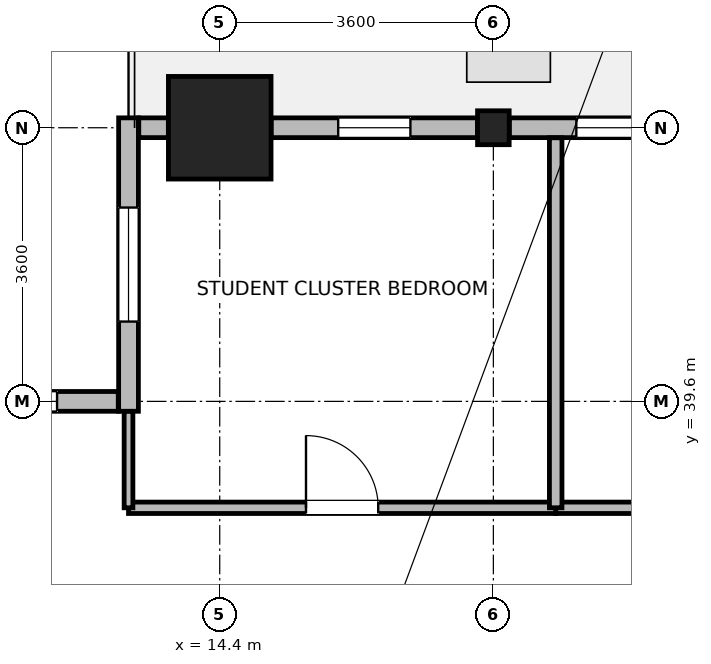
"""IFC4 building model, lengths in metres.
Left out: names, types, materials, properties, quantities, classifications, styles, units other than length and angle.
Written with IfcOpenShell. Run it as: python <this file> out.ifc"""

import sys

from ifc_helpers import new_model, si_unit, direction, frame, frame_2d, origin, origin_2d, place, context, subcontext, project, spatial, rectangle, i_section, extrude, source, transform, mapped, element, fill, save


model = new_model("IFC4")
c1 = context("Model", 3, precision=1e-05, world=origin(), true_north=direction((0.0, 1.0)))
c2 = subcontext(c1, "Body", "Model", "MODEL_VIEW")
j1 = project(units=[si_unit("LENGTHUNIT", "METRE"), si_unit("PLANEANGLEUNIT", "RADIAN")], contexts=[c1])
p1 = place(None, origin())
s1 = spatial("IfcSite", under=j1, at=p1, CompositionType="ELEMENT")
p2 = place(p1, origin())
s2 = spatial("IfcBuilding", under=s1, at=p2, CompositionType="ELEMENT")
p3 = place(p2, frame((0.0, 0.0, 51.2)))
s3 = spatial("IfcBuildingStorey", under=s2, at=p3, CompositionType="ELEMENT", Elevation=51.2)
m1 = source(origin(), c2, "Body", "SweptSolid", [
    extrude(rectangle(XDim=1.35, YDim=1.35, at=origin_2d()), origin(), (0.0, 0.0, 1.0), 3.7),
])
p4 = place(p3, frame((14.4, 43.2, 0.0), z_axis=(0.0, 0.0, 1.0), x_axis=(1.0, 0.0, 0.0)))
e1 = element("IfcColumn", 1, at=p4, inside=s3, PredefinedType="COLUMN", context=c2, shape_type="MappedRepresentation", body=[
    mapped(m1, transform((0.0, 0.0, 0.0), x_axis=(1.0, 0.0, 0.0), y_axis=(0.0, 1.0, 0.0), z_axis=(0.0, 0.0, 1.0), scale=1.0)),
])
m2 = source(origin(), c2, "Body", "SweptSolid", [
    extrude(i_section(OverallWidth=0.416, OverallDepth=0.446, WebThickness=0.029, FlangeThickness=0.04, FilletRadius=0.015, at=origin_2d()), origin(), (0.0, 0.0, 1.0), 3.7),
])
p5 = place(p3, frame((18.0, 43.2, 0.0), z_axis=(0.0, 0.0, 1.0), x_axis=(1.0, 0.0, 0.0)))
e2 = element("IfcColumn", 2, at=p5, inside=s3, PredefinedType="COLUMN", context=c2, shape_type="MappedRepresentation", body=[
    mapped(m2, transform((0.0, 0.0, 0.0), x_axis=(1.0, 0.0, 0.0), y_axis=(0.0, 1.0, 0.0), z_axis=(0.0, 0.0, 1.0), scale=1.0)),
])
p6 = place(p3, frame((18.209, 43.2, 0.0), z_axis=(0.0, 0.0, 1.0), x_axis=(1.0, 0.0, 0.0)))
e3 = element("IfcWall", 3, at=p6, inside=s3, PredefinedType="STANDARD", context=c2, shape_type="SweptSolid", body=[
    extrude(rectangle(XDim=2.715, YDim=0.26, at=frame_2d((1.357, 0.0))), origin(), (0.0, 0.0, 1.0), 2.93),
])
p7 = place(p6, frame((0.883, 0.0, 0.85)))
e4 = element("IfcOpeningElement", 4, at=p7, cuts=e3, PredefinedType="OPENING", context=c2, shape_type="SweptSolid", body=[
    extrude(rectangle(XDim=0.95, YDim=1.75, at=frame_2d((0.475, 0.875))), frame((0.0, 0.14, 0.0), z_axis=(0.0, -1.0, 0.0), x_axis=(1.0, 0.0, 0.0)), (0.0, 0.0, 1.0), 0.28),
])
p8 = place(p3, frame((15.076, 43.2, 0.0), z_axis=(0.0, 0.0, 1.0), x_axis=(1.0, 0.0, 0.0)))
e5 = element("IfcWall", 5, at=p8, inside=s3, PredefinedType="STANDARD", context=c2, shape_type="SweptSolid", body=[
    extrude(rectangle(XDim=2.715, YDim=0.26, at=frame_2d((1.357, 0.0))), origin(), (0.0, 0.0, 1.0), 2.93),
])
p9 = place(p8, frame((0.883, 0.0, 0.85)))
e6 = element("IfcOpeningElement", 6, at=p9, cuts=e5, PredefinedType="OPENING", context=c2, shape_type="SweptSolid", body=[
    extrude(rectangle(XDim=0.95, YDim=1.75, at=frame_2d((0.475, 0.875))), frame((0.0, 0.14, 0.0), z_axis=(0.0, -1.0, 0.0), x_axis=(1.0, 0.0, 0.0)), (0.0, 0.0, 1.0), 0.28),
])
p10 = place(p3, frame((13.335, 43.2, 0.0), z_axis=(0.0, 0.0, 1.0), x_axis=(1.0, 0.0, 0.0)))
e7 = element("IfcWall", 7, at=p10, inside=s3, PredefinedType="STANDARD", context=c2, shape_type="SweptSolid", body=[
    extrude(rectangle(XDim=0.389, YDim=0.26, at=frame_2d((0.195, 0.0))), origin(), (0.0, 0.0, 1.0), 3.43),
])
p11 = place(p3, frame((13.2, 39.47, 0.0), z_axis=(0.0, 0.0, 1.0), x_axis=(0.0, 1.0, 0.0)))
e8 = element("IfcWall", 8, at=p11, inside=s3, PredefinedType="STANDARD", context=c2, shape_type="SweptSolid", body=[
    extrude(rectangle(XDim=3.86, YDim=0.26, at=frame_2d((1.93, 0.0))), origin(), (0.0, 0.0, 1.0), 3.43),
])
p12 = place(p11, frame((1.18, 0.0, 0.85)))
e9 = element("IfcOpeningElement", 9, at=p12, cuts=e8, PredefinedType="OPENING", context=c2, shape_type="SweptSolid", body=[
    extrude(rectangle(XDim=1.5, YDim=1.85, at=frame_2d((0.75, 0.925))), frame((0.0, 0.14, 0.0), z_axis=(0.0, -1.0, 0.0), x_axis=(1.0, 0.0, 0.0)), (0.0, 0.0, 1.0), 0.28),
])
p13 = place(p3, frame((3.735, 39.6, 0.0), z_axis=(0.0, 0.0, 1.0), x_axis=(1.0, 0.0, 0.0)))
e10 = element("IfcWall", 10, at=p13, inside=s3, PredefinedType="STANDARD", context=c2, shape_type="SweptSolid", body=[
    extrude(rectangle(XDim=9.33, YDim=0.26, at=frame_2d((4.665, 0.0))), origin(), (0.0, 0.0, 1.0), 3.43),
])
p14 = place(p13, frame((0.805, 0.0, 0.85)))
e11 = element("IfcOpeningElement", 11, at=p14, cuts=e10, PredefinedType="OPENING", context=c2, shape_type="SweptSolid", body=[
    extrude(rectangle(XDim=1.5, YDim=1.85, at=frame_2d((0.75, 0.925))), frame((0.0, 0.14, 0.0), z_axis=(0.0, -1.0, 0.0), x_axis=(1.0, 0.0, 0.0)), (0.0, 0.0, 1.0), 0.28),
])
p15 = place(p13, frame((3.915, 0.0, 0.85)))
e12 = element("IfcOpeningElement", 12, at=p15, cuts=e10, PredefinedType="OPENING", context=c2, shape_type="SweptSolid", body=[
    extrude(rectangle(XDim=1.5, YDim=1.85, at=frame_2d((0.75, 0.925))), frame((0.0, 0.14, 0.0), z_axis=(0.0, -1.0, 0.0), x_axis=(1.0, 0.0, 0.0)), (0.0, 0.0, 1.0), 0.28),
])
p16 = place(p13, frame((7.025, 0.0, 0.85)))
e13 = element("IfcOpeningElement", 13, at=p16, cuts=e10, PredefinedType="OPENING", context=c2, shape_type="SweptSolid", body=[
    extrude(rectangle(XDim=1.5, YDim=1.85, at=frame_2d((0.75, 0.925))), frame((0.0, 0.14, 0.0), z_axis=(0.0, -1.0, 0.0), x_axis=(1.0, 0.0, 0.0)), (0.0, 0.0, 1.0), 0.28),
])
p17 = place(p3, frame((18.82, 38.2, 0.0), z_axis=(0.0, 0.0, 1.0), x_axis=(1.0, 0.0, 0.0)))
e14 = element("IfcWall", 14, at=p17, inside=s3, PredefinedType="PARTITIONING", context=c2, shape_type="SweptSolid", body=[
    extrude(rectangle(XDim=5.94, YDim=0.15, at=frame_2d((2.97, 0.0))), origin(), (0.0, 0.0, 1.0), 3.43),
])
p18 = place(p17, frame((2.495, 0.0, 0.0)))
e15 = element("IfcOpeningElement", 15, at=p18, cuts=e14, PredefinedType="OPENING", context=c2, shape_type="SweptSolid", body=[
    extrude(rectangle(XDim=0.95, YDim=2.1, at=frame_2d((0.475, 1.05))), frame((0.0, 0.085, 0.0), z_axis=(0.0, -1.0, 0.0), x_axis=(1.0, 0.0, 0.0)), (0.0, 0.0, 1.0), 0.17),
])
p19 = place(p3, frame((13.2, 38.2, 0.0), z_axis=(0.0, 0.0, 1.0), x_axis=(1.0, 0.0, 0.0)))
e16 = element("IfcWall", 16, at=p19, inside=s3, PredefinedType="PARTITIONING", context=c2, shape_type="SweptSolid", body=[
    extrude(rectangle(XDim=5.62, YDim=0.15, at=frame_2d((2.81, 0.0))), origin(), (0.0, 0.0, 1.0), 3.43),
])
p20 = place(p19, frame((2.335, 0.0, 0.0)))
e17 = element("IfcOpeningElement", 17, at=p20, cuts=e16, PredefinedType="OPENING", context=c2, shape_type="SweptSolid", body=[
    extrude(rectangle(XDim=0.95, YDim=2.1, at=frame_2d((0.475, 1.05))), frame((0.0, 0.085, 0.0), z_axis=(0.0, -1.0, 0.0), x_axis=(1.0, 0.0, 0.0)), (0.0, 0.0, 1.0), 0.17),
])
p21 = place(p3, frame((13.2, 38.2, 0.0), z_axis=(0.0, 0.0, 1.0), x_axis=(0.0, 1.0, 0.0)))
e18 = element("IfcWall", 18, at=p21, inside=s3, PredefinedType="PARTITIONING", context=c2, shape_type="SweptSolid", body=[
    extrude(rectangle(XDim=1.268, YDim=0.115, at=frame_2d((0.634, 0.0))), origin(), (0.0, 0.0, 1.0), 3.43),
])
p22 = place(p3, frame((18.82, 38.2, 0.0), z_axis=(0.0, 0.0, 1.0), x_axis=(0.0, 1.0, 0.0)))
e19 = element("IfcWall", 19, at=p22, inside=s3, PredefinedType="PARTITIONING", context=c2, shape_type="SweptSolid", body=[
    extrude(rectangle(XDim=4.868, YDim=0.165, at=frame_2d((2.434, 0.0))), origin(), (0.0, 0.0, 1.0), 3.43),
])
p23 = place(p7, origin())
e20 = element("IfcWindow", 20, at=p23, inside=s3, PartitioningType="SINGLE_PANEL", PredefinedType="WINDOW", context=c2, shape_type="SweptSolid", body=[
    extrude(rectangle(XDim=0.95, YDim=1.75, at=frame_2d((0.475, 0.875))), frame((0.0, 0.03, 0.0), z_axis=(0.0, -1.0, 0.0), x_axis=(1.0, 0.0, 0.0)), (0.0, 0.0, 1.0), 0.06),
])
fill(e4, e20)
p24 = place(p9, origin())
e21 = element("IfcWindow", 21, at=p24, inside=s3, PartitioningType="SINGLE_PANEL", PredefinedType="WINDOW", context=c2, shape_type="SweptSolid", body=[
    extrude(rectangle(XDim=0.95, YDim=1.75, at=frame_2d((0.475, 0.875))), frame((0.0, 0.03, 0.0), z_axis=(0.0, -1.0, 0.0), x_axis=(1.0, 0.0, 0.0)), (0.0, 0.0, 1.0), 0.06),
])
fill(e6, e21)
p25 = place(p12, origin())
e22 = element("IfcWindow", 22, at=p25, inside=s3, PartitioningType="SINGLE_PANEL", PredefinedType="WINDOW", context=c2, shape_type="SweptSolid", body=[
    extrude(rectangle(XDim=1.5, YDim=1.85, at=frame_2d((0.75, 0.925))), frame((0.0, 0.03, 0.0), z_axis=(0.0, -1.0, 0.0), x_axis=(1.0, 0.0, 0.0)), (0.0, 0.0, 1.0), 0.06),
])
fill(e9, e22)
p26 = place(p16, origin())
e23 = element("IfcWindow", 23, at=p26, inside=s3, PartitioningType="SINGLE_PANEL", PredefinedType="WINDOW", context=c2, shape_type="SweptSolid", body=[
    extrude(rectangle(XDim=1.5, YDim=1.85, at=frame_2d((0.75, 0.925))), frame((0.0, 0.03, 0.0), z_axis=(0.0, -1.0, 0.0), x_axis=(1.0, 0.0, 0.0)), (0.0, 0.0, 1.0), 0.06),
])
fill(e13, e23)
p27 = place(p20, origin())
e24 = element("IfcDoor", 24, at=p27, inside=s3, OperationType="SINGLE_SWING_LEFT", PredefinedType="DOOR", context=c2, shape_type="SweptSolid", body=[
    extrude(rectangle(XDim=0.95, YDim=2.1, at=frame_2d((0.475, 1.05))), frame((0.0, 0.025, 0.0), z_axis=(0.0, -1.0, 0.0), x_axis=(1.0, 0.0, 0.0)), (0.0, 0.0, 1.0), 0.05),
])
fill(e17, e24)
save(model, sys.argv[1])
